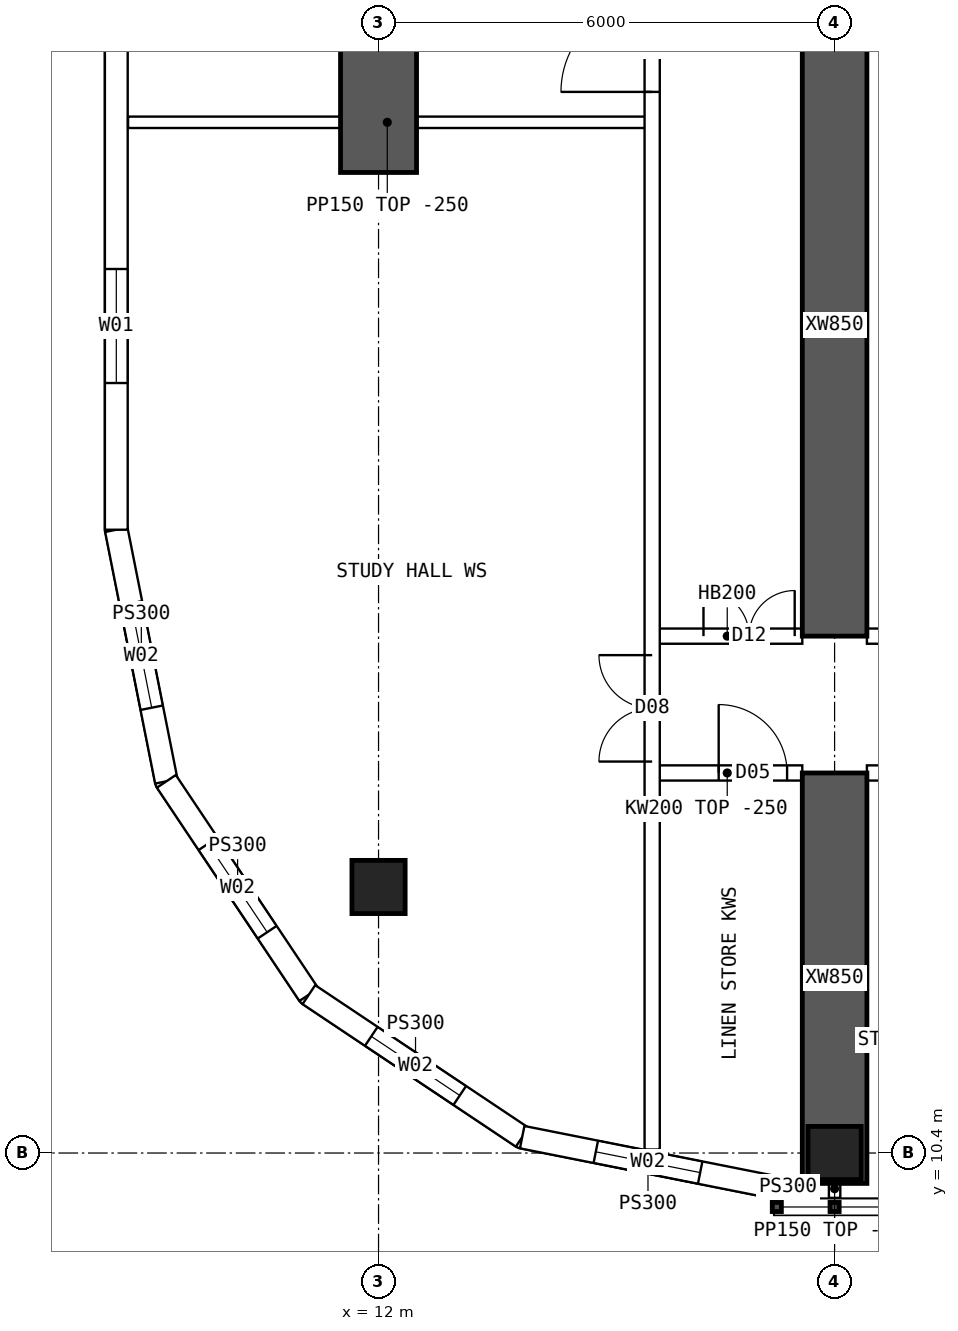
"""IFC4 building model, lengths in metres.
Left out: names, types, materials, properties, quantities, classifications, styles, units other than length and angle.
Written with IfcOpenShell. Run it as: python <this file> out.ifc"""

import sys

from ifc_helpers import new_model, si_unit, direction, frame, frame_2d, origin, origin_2d, place, context, subcontext, project, spatial, polyline, rectangle, hollow_rectangle, outline, extrude, element, fill, save


model = new_model("IFC4")
c1 = context("Model", 3, precision=1e-05, world=origin(), true_north=direction((0.0, 1.0)))
c2 = subcontext(c1, "Body", "Model", "MODEL_VIEW")
j1 = project(units=[si_unit("LENGTHUNIT", "METRE"), si_unit("PLANEANGLEUNIT", "RADIAN")], contexts=[c1])
p1 = place(None, origin())
s1 = spatial("IfcSite", under=j1, at=p1, CompositionType="ELEMENT")
p2 = place(p1, origin())
s2 = spatial("IfcBuilding", under=s1, at=p2, CompositionType="ELEMENT")
p3 = place(p2, frame((0.0, 0.0, 163.6)))
s3 = spatial("IfcBuildingStorey", under=s2, at=p3, CompositionType="ELEMENT", Elevation=163.6)
for number, where, z_axis, x_axis in (
    (1, (18.0, 10.4, 0.0), (0.0, 0.0, 1.0), (1.0, 0.0, 0.0)),
    (2, (12.0, 13.9, 0.0), (0.0, 0.0, 1.0), (1.0, 0.0, 0.0)),
):
    element("IfcColumn", number, at=place(p3, frame(where, z_axis=z_axis, x_axis=x_axis)), inside=s3, PredefinedType="COLUMN", context=c2, shape_type="SweptSolid", body=[
        extrude(hollow_rectangle(XDim=0.7, YDim=0.7, WallThickness=0.07, at=origin_2d()), origin(), (0.0, 0.0, 1.0), 3.75),
    ])
p4 = place(p3, frame((12.0, 23.3, 0.0), z_axis=(0.0, 0.0, 1.0), x_axis=(0.0, 1.0, 0.0)))
e3 = element("IfcWall", 3, at=p4, inside=s3, PredefinedType="SHEAR", context=c2, shape_type="SweptSolid", body=[
    extrude(rectangle(XDim=5.0, YDim=1.0, at=frame_2d((2.5, 0.0))), origin(), (0.0, 0.0, 1.0), 3.75),
])
p5 = place(p3, frame((18.0, 10.0, 0.0), z_axis=(0.0, 0.0, 1.0), x_axis=(0.0, 1.0, 0.0)))
e4 = element("IfcWall", 4, at=p5, inside=s3, PredefinedType="SHEAR", context=c2, shape_type="SweptSolid", body=[
    extrude(rectangle(XDim=5.4, YDim=0.85, at=frame_2d((2.7, 0.0))), origin(), (0.0, 0.0, 1.0), 3.75),
])
p6 = place(p3, frame((18.0, 17.2, 0.0), z_axis=(0.0, 0.0, 1.0), x_axis=(0.0, 1.0, 0.0)))
e5 = element("IfcWall", 5, at=p6, inside=s3, PredefinedType="SHEAR", context=c2, shape_type="SweptSolid", body=[
    extrude(rectangle(XDim=8.175, YDim=0.85, at=frame_2d((4.087, 0.0))), origin(), (0.0, 0.0, 1.0), 3.75),
])
p7 = place(p3, frame((8.55, 45.4, 0.0), z_axis=(0.0, 0.0, 1.0), x_axis=(0.0, -1.0, 0.0)))
e6 = element("IfcWall", 6, at=p7, inside=s3, PredefinedType="SOLIDWALL", context=c2, shape_type="SweptSolid", body=[
    extrude(outline(polyline([(-0.015, -0.15), (26.815, -0.15), (26.785, 0.15), (0.015, 0.15), (-0.015, -0.15)])), origin(), (0.0, 0.0, 1.0), 3.5),
])
p8 = place(p7, frame((1.93, 0.0, 0.9)))
e7 = element("IfcOpeningElement", 7, at=p8, cuts=e6, PredefinedType="OPENING", context=c2, shape_type="SweptSolid", body=[
    extrude(rectangle(XDim=1.5, YDim=2.0, at=frame_2d((0.75, 1.0))), frame((0.0, 0.16, 0.0), z_axis=(0.0, -1.0, 0.0), x_axis=(1.0, 0.0, 0.0)), (0.0, 0.0, 1.0), 0.32),
])
p9 = place(p7, frame((7.29, 0.0, 0.9)))
e8 = element("IfcOpeningElement", 8, at=p9, cuts=e6, PredefinedType="OPENING", context=c2, shape_type="SweptSolid", body=[
    extrude(rectangle(XDim=1.5, YDim=2.0, at=frame_2d((0.75, 1.0))), frame((0.0, 0.16, 0.0), z_axis=(0.0, -1.0, 0.0), x_axis=(1.0, 0.0, 0.0)), (0.0, 0.0, 1.0), 0.32),
])
p10 = place(p7, frame((12.65, 0.0, 0.9)))
e9 = element("IfcOpeningElement", 9, at=p10, cuts=e6, PredefinedType="OPENING", context=c2, shape_type="SweptSolid", body=[
    extrude(rectangle(XDim=1.5, YDim=2.0, at=frame_2d((0.75, 1.0))), frame((0.0, 0.16, 0.0), z_axis=(0.0, -1.0, 0.0), x_axis=(1.0, 0.0, 0.0)), (0.0, 0.0, 1.0), 0.32),
])
p11 = place(p7, frame((18.01, 0.0, 0.9)))
e10 = element("IfcOpeningElement", 10, at=p11, cuts=e6, PredefinedType="OPENING", context=c2, shape_type="SweptSolid", body=[
    extrude(rectangle(XDim=1.5, YDim=2.0, at=frame_2d((0.75, 1.0))), frame((0.0, 0.16, 0.0), z_axis=(0.0, -1.0, 0.0), x_axis=(1.0, 0.0, 0.0)), (0.0, 0.0, 1.0), 0.32),
])
p12 = place(p7, frame((23.37, 0.0, 0.9)))
e11 = element("IfcOpeningElement", 11, at=p12, cuts=e6, PredefinedType="OPENING", context=c2, shape_type="SweptSolid", body=[
    extrude(rectangle(XDim=1.5, YDim=2.0, at=frame_2d((0.75, 1.0))), frame((0.0, 0.16, 0.0), z_axis=(0.0, -1.0, 0.0), x_axis=(1.0, 0.0, 0.0)), (0.0, 0.0, 1.0), 0.32),
])
p13 = place(p3, frame((8.55, 18.6, 0.0), z_axis=(0.0, 0.0, 1.0), x_axis=(0.19508664885, -0.980786011034, 0.0)))
e12 = element("IfcWall", 12, at=p13, inside=s3, PredefinedType="SOLIDWALL", context=c2, shape_type="SweptSolid", body=[
    extrude(outline(polyline([(-0.015, -0.15), (3.405, -0.15), (3.345, 0.15), (0.015, 0.15), (-0.015, -0.15)])), origin(), (0.0, 0.0, 1.0), 3.5),
])
p14 = place(p13, frame((0.988, 0.0, 0.9)))
e13 = element("IfcOpeningElement", 13, at=p14, cuts=e12, PredefinedType="OPENING", context=c2, shape_type="SweptSolid", body=[
    extrude(rectangle(XDim=1.4, YDim=1.8, at=frame_2d((0.7, 0.9))), frame((0.0, 0.16, 0.0), z_axis=(0.0, -1.0, 0.0), x_axis=(1.0, 0.0, 0.0)), (0.0, 0.0, 1.0), 0.32),
])
p15 = place(p3, frame((9.208, 15.29, 0.0), z_axis=(0.0, 0.0, 1.0), x_axis=(0.555534554399, -0.831493450887, 0.0)))
e14 = element("IfcWall", 14, at=p15, inside=s3, PredefinedType="SOLIDWALL", context=c2, shape_type="SweptSolid", body=[
    extrude(outline(polyline([(-0.03, -0.15), (3.405, -0.15), (3.345, 0.15), (0.03, 0.15), (-0.03, -0.15)])), origin(), (0.0, 0.0, 1.0), 3.5),
])
p16 = place(p15, frame((0.988, 0.0, 0.9)))
e15 = element("IfcOpeningElement", 15, at=p16, cuts=e14, PredefinedType="OPENING", context=c2, shape_type="SweptSolid", body=[
    extrude(rectangle(XDim=1.4, YDim=1.8, at=frame_2d((0.7, 0.9))), frame((0.0, 0.16, 0.0), z_axis=(0.0, -1.0, 0.0), x_axis=(1.0, 0.0, 0.0)), (0.0, 0.0, 1.0), 0.32),
])
p17 = place(p3, frame((11.083, 12.483, 0.0), z_axis=(0.0, 0.0, 1.0), x_axis=(0.831493450887, -0.555534554399, 0.0)))
e16 = element("IfcWall", 16, at=p17, inside=s3, PredefinedType="SOLIDWALL", context=c2, shape_type="SweptSolid", body=[
    extrude(outline(polyline([(-0.03, -0.15), (3.405, -0.15), (3.345, 0.15), (0.03, 0.15), (-0.03, -0.15)])), origin(), (0.0, 0.0, 1.0), 3.5),
])
p18 = place(p17, frame((0.988, 0.0, 0.9)))
e17 = element("IfcOpeningElement", 17, at=p18, cuts=e16, PredefinedType="OPENING", context=c2, shape_type="SweptSolid", body=[
    extrude(rectangle(XDim=1.4, YDim=1.8, at=frame_2d((0.7, 0.9))), frame((0.0, 0.16, 0.0), z_axis=(0.0, -1.0, 0.0), x_axis=(1.0, 0.0, 0.0)), (0.0, 0.0, 1.0), 0.32),
])
p19 = place(p3, frame((13.89, 10.608, 0.0), z_axis=(0.0, 0.0, 1.0), x_axis=(0.98078325777, -0.195100490205, 0.0)))
e18 = element("IfcWall", 18, at=p19, inside=s3, PredefinedType="SOLIDWALL", context=c2, shape_type="SweptSolid", body=[
    extrude(outline(polyline([(-0.03, -0.15), (3.405, -0.15), (3.345, 0.15), (0.03, 0.15), (-0.03, -0.15)])), origin(), (0.0, 0.0, 1.0), 3.5),
])
p20 = place(p19, frame((0.988, 0.0, 0.9)))
e19 = element("IfcOpeningElement", 19, at=p20, cuts=e18, PredefinedType="OPENING", context=c2, shape_type="SweptSolid", body=[
    extrude(rectangle(XDim=1.4, YDim=1.8, at=frame_2d((0.7, 0.9))), frame((0.0, 0.16, 0.0), z_axis=(0.0, -1.0, 0.0), x_axis=(1.0, 0.0, 0.0)), (0.0, 0.0, 1.0), 0.32),
])
p21 = place(p3, frame((17.2, 9.95, 0.0), z_axis=(0.0, 0.0, 1.0), x_axis=(1.0, 0.0, 0.0)))
e20 = element("IfcWall", 20, at=p21, inside=s3, PredefinedType="SOLIDWALL", context=c2, shape_type="SweptSolid", body=[
    extrude(rectangle(XDim=0.375, YDim=0.3, at=frame_2d((0.188, 0.0))), origin(), (0.0, 0.0, 1.0), 3.5),
])
p22 = place(p3, frame((15.6, 15.4, 0.0), z_axis=(0.0, 0.0, 1.0), x_axis=(1.0, 0.0, 0.0)))
e21 = element("IfcWall", 21, at=p22, inside=s3, PredefinedType="SOLIDWALL", context=c2, shape_type="SweptSolid", body=[
    extrude(rectangle(XDim=1.975, YDim=0.2, at=frame_2d((0.987, 0.0))), origin(), (0.0, 0.0, 1.0), 3.5),
])
p23 = place(p22, frame((0.875, 0.0, 0.0)))
e22 = element("IfcOpeningElement", 22, at=p23, cuts=e21, PredefinedType="OPENING", context=c2, shape_type="SweptSolid", body=[
    extrude(rectangle(XDim=0.9, YDim=2.1, at=frame_2d((0.45, 1.05))), frame((0.0, 0.11, 0.0), z_axis=(0.0, -1.0, 0.0), x_axis=(1.0, 0.0, 0.0)), (0.0, 0.0, 1.0), 0.22),
])
p24 = place(p3, frame((15.6, 17.2, 0.0), z_axis=(0.0, 0.0, 1.0), x_axis=(1.0, 0.0, 0.0)))
e23 = element("IfcWall", 23, at=p24, inside=s3, PredefinedType="SOLIDWALL", context=c2, shape_type="SweptSolid", body=[
    extrude(rectangle(XDim=1.975, YDim=0.2, at=frame_2d((0.987, 0.0))), origin(), (0.0, 0.0, 1.0), 3.5),
])
p25 = place(p24, frame((0.675, 0.0, 0.0)))
e24 = element("IfcOpeningElement", 24, at=p25, cuts=e23, PredefinedType="OPENING", context=c2, shape_type="SweptSolid", body=[
    extrude(rectangle(XDim=1.2, YDim=2.1, at=frame_2d((0.6, 1.05))), frame((0.0, 0.11, 0.0), z_axis=(0.0, -1.0, 0.0), x_axis=(1.0, 0.0, 0.0)), (0.0, 0.0, 1.0), 0.22),
])
p26 = place(p3, frame((18.425, 15.4, 0.0), z_axis=(0.0, 0.0, 1.0), x_axis=(1.0, 0.0, 0.0)))
e25 = element("IfcWall", 25, at=p26, inside=s3, PredefinedType="SOLIDWALL", context=c2, shape_type="SweptSolid", body=[
    extrude(outline(polyline([(0.0, 0.0), (5.15, 0.0), (5.15, 3.1), (0.0, 3.1), (0.0, 0.0)])), frame((0.0, 0.1, 0.0), z_axis=(0.0, -1.0, 0.0), x_axis=(1.0, 0.0, 0.0)), (0.0, 0.0, 1.0), 0.2),
])
p27 = place(p26, frame((2.3, 0.0, 0.0)))
e26 = element("IfcOpeningElement", 26, at=p27, cuts=e25, PredefinedType="OPENING", context=c2, shape_type="SweptSolid", body=[
    extrude(rectangle(XDim=0.9, YDim=2.1, at=frame_2d((0.45, 1.05))), frame((0.0, 0.11, 0.0), z_axis=(0.0, -1.0, 0.0), x_axis=(1.0, 0.0, 0.0)), (0.0, 0.0, 1.0), 0.22),
])
p28 = place(p3, frame((18.425, 17.2, 0.0), z_axis=(0.0, 0.0, 1.0), x_axis=(1.0, 0.0, 0.0)))
e27 = element("IfcWall", 27, at=p28, inside=s3, PredefinedType="SOLIDWALL", context=c2, shape_type="SweptSolid", body=[
    extrude(rectangle(XDim=5.15, YDim=0.2, at=frame_2d((2.575, 0.0))), origin(), (0.0, 0.0, 1.0), 3.5),
])
p29 = place(p28, frame((0.8, 0.0, 0.0)))
e28 = element("IfcOpeningElement", 28, at=p29, cuts=e27, PredefinedType="OPENING", context=c2, shape_type="SweptSolid", body=[
    extrude(rectangle(XDim=1.0, YDim=2.1, at=frame_2d((0.5, 1.05))), frame((0.0, 0.11, 0.0), z_axis=(0.0, -1.0, 0.0), x_axis=(1.0, 0.0, 0.0)), (0.0, 0.0, 1.0), 0.22),
])
p30 = place(p3, frame((15.6, 10.446, 0.0), z_axis=(0.0, 0.0, 1.0), x_axis=(0.0, 1.0, 0.0)))
e29 = element("IfcWall", 29, at=p30, inside=s3, PredefinedType="SOLIDWALL", context=c2, shape_type="SweptSolid", body=[
    extrude(rectangle(XDim=43.107, YDim=0.2, at=frame_2d((21.554, 0.0))), origin(), (0.0, 0.0, 1.0), 3.5),
])
p31 = place(p30, frame((13.914, 0.0, 0.0)))
e30 = element("IfcOpeningElement", 30, at=p31, cuts=e29, PredefinedType="OPENING", context=c2, shape_type="SweptSolid", body=[
    extrude(rectangle(XDim=1.2, YDim=2.1, at=frame_2d((0.6, 1.05))), frame((0.0, 0.11, 0.0), z_axis=(0.0, -1.0, 0.0), x_axis=(1.0, 0.0, 0.0)), (0.0, 0.0, 1.0), 0.22),
])
p32 = place(p30, frame((5.104, 0.0, 0.0)))
e31 = element("IfcOpeningElement", 31, at=p32, cuts=e29, PredefinedType="OPENING", context=c2, shape_type="SweptSolid", body=[
    extrude(rectangle(XDim=1.4, YDim=2.1, at=frame_2d((0.7, 1.05))), frame((0.0, 0.11, 0.0), z_axis=(0.0, -1.0, 0.0), x_axis=(1.0, 0.0, 0.0)), (0.0, 0.0, 1.0), 0.22),
])
p33 = place(p30, frame((36.504, 0.0, 0.0)))
e32 = element("IfcOpeningElement", 32, at=p33, cuts=e29, PredefinedType="OPENING", context=c2, shape_type="SweptSolid", body=[
    extrude(rectangle(XDim=1.4, YDim=2.1, at=frame_2d((0.7, 1.05))), frame((0.0, 0.11, 0.0), z_axis=(0.0, -1.0, 0.0), x_axis=(1.0, 0.0, 0.0)), (0.0, 0.0, 1.0), 0.22),
])
p34 = place(p3, frame((8.705, 23.96, 0.0), z_axis=(0.0, 0.0, 1.0), x_axis=(1.0, 0.0, 0.0)))
e33 = element("IfcWall", 33, at=p34, inside=s3, PredefinedType="PARTITIONING", context=c2, shape_type="SweptSolid", body=[
    extrude(rectangle(XDim=6.82, YDim=0.15, at=frame_2d((3.41, 0.0))), origin(), (0.0, 0.0, 1.0), 3.5),
])
p35 = place(p3, frame((18.0, 10.05, 0.0), z_axis=(0.0, 0.0, 1.0), x_axis=(0.0, -1.0, 0.0)))
e34 = element("IfcWall", 34, at=p35, inside=s3, PredefinedType="PARTITIONING", context=c2, shape_type="SweptSolid", body=[
    extrude(rectangle(XDim=0.24, YDim=0.15, at=frame_2d((0.12, 0.0))), origin(), (0.0, 0.0, 1.0), 3.5),
])
p36 = place(p12, origin())
e35 = element("IfcWindow", 35, at=p36, inside=s3, PartitioningType="SINGLE_PANEL", PredefinedType="WINDOW", context=c2, shape_type="SweptSolid", body=[
    extrude(rectangle(XDim=1.5, YDim=2.0, at=frame_2d((0.75, 1.0))), frame((0.0, 0.03, 0.0), z_axis=(0.0, -1.0, 0.0), x_axis=(1.0, 0.0, 0.0)), (0.0, 0.0, 1.0), 0.06),
])
fill(e11, e35)
p37 = place(p14, origin())
e36 = element("IfcWindow", 36, at=p37, inside=s3, PartitioningType="SINGLE_PANEL", PredefinedType="WINDOW", context=c2, shape_type="SweptSolid", body=[
    extrude(rectangle(XDim=1.4, YDim=1.8, at=frame_2d((0.7, 0.9))), frame((0.0, 0.03, 0.0), z_axis=(0.0, -1.0, 0.0), x_axis=(1.0, 0.0, 0.0)), (0.0, 0.0, 1.0), 0.06),
])
fill(e13, e36)
p38 = place(p16, origin())
e37 = element("IfcWindow", 37, at=p38, inside=s3, PartitioningType="SINGLE_PANEL", PredefinedType="WINDOW", context=c2, shape_type="SweptSolid", body=[
    extrude(rectangle(XDim=1.4, YDim=1.8, at=frame_2d((0.7, 0.9))), frame((0.0, 0.03, 0.0), z_axis=(0.0, -1.0, 0.0), x_axis=(1.0, 0.0, 0.0)), (0.0, 0.0, 1.0), 0.06),
])
fill(e15, e37)
p39 = place(p18, origin())
e38 = element("IfcWindow", 38, at=p39, inside=s3, PartitioningType="SINGLE_PANEL", PredefinedType="WINDOW", context=c2, shape_type="SweptSolid", body=[
    extrude(rectangle(XDim=1.4, YDim=1.8, at=frame_2d((0.7, 0.9))), frame((0.0, 0.03, 0.0), z_axis=(0.0, -1.0, 0.0), x_axis=(1.0, 0.0, 0.0)), (0.0, 0.0, 1.0), 0.06),
])
fill(e17, e38)
p40 = place(p20, origin())
e39 = element("IfcWindow", 39, at=p40, inside=s3, PartitioningType="SINGLE_PANEL", PredefinedType="WINDOW", context=c2, shape_type="SweptSolid", body=[
    extrude(rectangle(XDim=1.4, YDim=1.8, at=frame_2d((0.7, 0.9))), frame((0.0, 0.03, 0.0), z_axis=(0.0, -1.0, 0.0), x_axis=(1.0, 0.0, 0.0)), (0.0, 0.0, 1.0), 0.06),
])
fill(e19, e39)
p41 = place(p25, origin())
e40 = element("IfcDoor", 40, at=p41, inside=s3, OperationType="DOUBLE_DOOR_SINGLE_SWING", PredefinedType="DOOR", context=c2, shape_type="SweptSolid", body=[
    extrude(rectangle(XDim=1.2, YDim=2.1, at=frame_2d((0.6, 1.05))), frame((0.0, 0.025, 0.0), z_axis=(0.0, -1.0, 0.0), x_axis=(1.0, 0.0, 0.0)), (0.0, 0.0, 1.0), 0.05),
])
fill(e24, e40)
p42 = place(p31, origin())
e41 = element("IfcDoor", 41, at=p42, inside=s3, OperationType="SINGLE_SWING_LEFT", PredefinedType="DOOR", context=c2, shape_type="SweptSolid", body=[
    extrude(rectangle(XDim=1.2, YDim=2.1, at=frame_2d((0.6, 1.05))), frame((0.0, 0.025, 0.0), z_axis=(0.0, -1.0, 0.0), x_axis=(1.0, 0.0, 0.0)), (0.0, 0.0, 1.0), 0.05),
])
fill(e30, e41)
p43 = place(p32, origin())
e42 = element("IfcDoor", 42, at=p43, inside=s3, OperationType="DOUBLE_DOOR_SINGLE_SWING", PredefinedType="DOOR", context=c2, shape_type="SweptSolid", body=[
    extrude(rectangle(XDim=1.4, YDim=2.1, at=frame_2d((0.7, 1.05))), frame((0.0, 0.025, 0.0), z_axis=(0.0, -1.0, 0.0), x_axis=(1.0, 0.0, 0.0)), (0.0, 0.0, 1.0), 0.05),
])
fill(e31, e42)
p44 = place(p23, origin())
e43 = element("IfcDoor", 43, at=p44, inside=s3, OperationType="SINGLE_SWING_LEFT", PredefinedType="DOOR", context=c2, shape_type="SweptSolid", body=[
    extrude(rectangle(XDim=0.9, YDim=2.1, at=frame_2d((0.45, 1.05))), frame((0.0, 0.025, 0.0), z_axis=(0.0, -1.0, 0.0), x_axis=(1.0, 0.0, 0.0)), (0.0, 0.0, 1.0), 0.05),
])
fill(e22, e43)
save(model, sys.argv[1])
